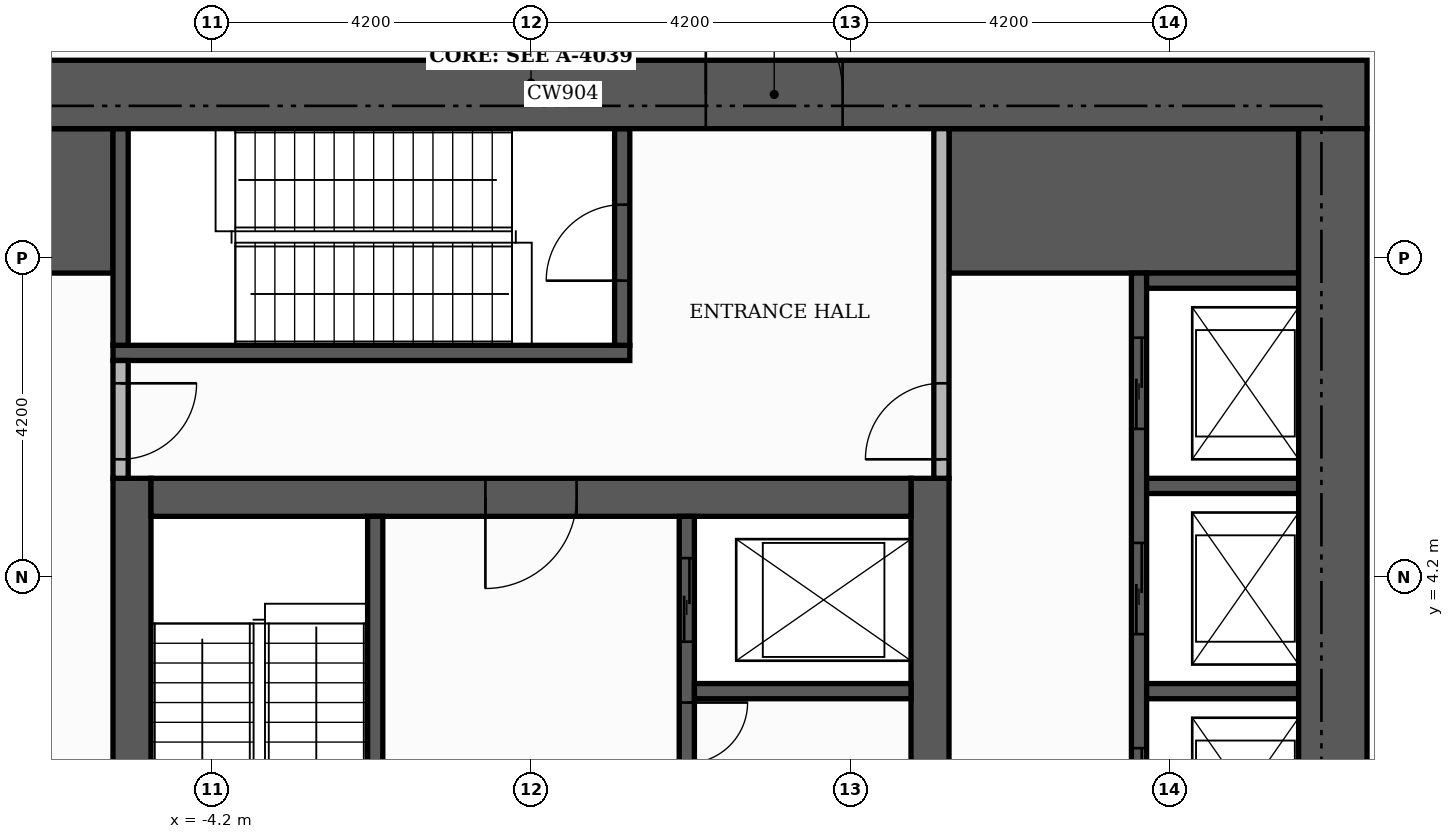
"""IFC4 building model, lengths in metres.
Left out: names, types, materials, properties, quantities, classifications, styles, units other than length and angle.
Written with IfcOpenShell. Run it as: python <this file> out.ifc"""

import sys

from ifc_helpers import new_model, si_unit, direction, frame, frame_2d, origin, place, context, subcontext, project, spatial, rectangle, extrude, element, fill, save


model = new_model("IFC4")
c1 = context("Model", 3, precision=1e-05, world=origin(), true_north=direction((0.0, 1.0)))
c2 = subcontext(c1, "Body", "Model", "MODEL_VIEW")
j1 = project(units=[si_unit("LENGTHUNIT", "METRE"), si_unit("PLANEANGLEUNIT", "RADIAN")], contexts=[c1])
p1 = place(None, origin())
s1 = spatial("IfcSite", under=j1, at=p1, CompositionType="ELEMENT")
p2 = place(p1, origin())
s2 = spatial("IfcBuilding", under=s1, at=p2, CompositionType="ELEMENT")
p3 = place(p2, frame((0.0, 0.0, 235.2)))
s3 = spatial("IfcBuildingStorey", under=s2, at=p3, CompositionType="ELEMENT", Elevation=235.2)
for number, where, z_axis, x_axis in (
    (1, (-5.25, -5.0, 0.0), (0.0, 0.0, 1.0), (0.0, 1.0, 0.0)),
    (2, (5.25, -5.0, 0.0), (0.0, 0.0, 1.0), (0.0, 1.0, 0.0)),
):
    element("IfcWall", number, at=place(p3, frame(where, z_axis=z_axis, x_axis=x_axis)), inside=s3, PredefinedType="SHEAR", context=c2, shape_type="SweptSolid", body=[
        extrude(rectangle(XDim=10.5, YDim=0.5, at=frame_2d((5.25, 0.0))), origin(), (0.0, 0.0, 1.0), 4.98),
    ])
p4 = place(p3, frame((-5.0, 5.25, 0.0), z_axis=(0.0, 0.0, 1.0), x_axis=(1.0, 0.0, 0.0)))
e3 = element("IfcWall", 3, at=p4, inside=s3, PredefinedType="SHEAR", context=c2, shape_type="SweptSolid", body=[
    extrude(rectangle(XDim=10.0, YDim=0.5, at=frame_2d((5.0, 0.0))), origin(), (0.0, 0.0, 1.0), 4.98),
])
p5 = place(p4, frame((4.4, 0.0, 0.0)))
e4 = element("IfcOpeningElement", 4, at=p5, cuts=e3, PredefinedType="OPENING", context=c2, shape_type="SweptSolid", body=[
    extrude(rectangle(XDim=1.2, YDim=2.1, at=frame_2d((0.6, 1.05))), frame((0.0, 0.26, 0.0), z_axis=(0.0, -1.0, 0.0), x_axis=(1.0, 0.0, 0.0)), (0.0, 0.0, 1.0), 0.52),
])
for number, where, z_axis, x_axis in (
    (5, (-10.1, 9.15, 0.0), (0.0, 0.0, 1.0), (1.0, 0.0, 0.0)),
    (6, (5.5, 9.15, 0.0), (0.0, 0.0, 1.0), (1.0, 0.0, 0.0)),
):
    element("IfcWall", number, at=place(p3, frame(where, z_axis=z_axis, x_axis=x_axis)), inside=s3, PredefinedType="SHEAR", context=c2, shape_type="SweptSolid", body=[
        extrude(rectangle(XDim=4.6, YDim=1.9, at=frame_2d((2.3, 0.0))), origin(), (0.0, 0.0, 1.0), 4.98),
    ])
p6 = place(p3, frame((-2.05, -1.4, 0.0), z_axis=(0.0, 0.0, 1.0), x_axis=(0.0, 1.0, 0.0)))
e7 = element("IfcWall", 7, at=p6, inside=s3, PredefinedType="SHEAR", context=c2, shape_type="SweptSolid", body=[
    extrude(rectangle(XDim=6.4, YDim=0.2, at=frame_2d((3.2, 0.0))), origin(), (0.0, 0.0, 1.0), 4.98),
])
p7 = place(p6, frame((0.15, 0.0, 0.0)))
e8 = element("IfcOpeningElement", 8, at=p7, cuts=e7, PredefinedType="OPENING", context=c2, shape_type="SweptSolid", body=[
    extrude(rectangle(XDim=1.0, YDim=2.1, at=frame_2d((0.5, 1.05))), frame((0.0, 0.11, 0.0), z_axis=(0.0, -1.0, 0.0), x_axis=(1.0, 0.0, 0.0)), (0.0, 0.0, 1.0), 0.22),
])
p8 = place(p3, frame((-5.5, 7.15, 0.0), z_axis=(0.0, 0.0, 1.0), x_axis=(1.0, 0.0, 0.0)))
e9 = element("IfcWall", 9, at=p8, inside=s3, PredefinedType="SHEAR", context=c2, shape_type="SweptSolid", body=[
    extrude(rectangle(XDim=6.8, YDim=0.2, at=frame_2d((3.4, 0.0))), origin(), (0.0, 0.0, 1.0), 4.98),
])
p9 = place(p3, frame((-5.4, 7.25, 0.0), z_axis=(0.0, 0.0, 1.0), x_axis=(0.0, 1.0, 0.0)))
e10 = element("IfcWall", 10, at=p9, inside=s3, PredefinedType="SHEAR", context=c2, shape_type="SweptSolid", body=[
    extrude(rectangle(XDim=2.85, YDim=0.2, at=frame_2d((1.425, 0.0))), origin(), (0.0, 0.0, 1.0), 4.98),
])
p10 = place(p3, frame((1.2, 7.25, 0.0), z_axis=(0.0, 0.0, 1.0), x_axis=(0.0, 1.0, 0.0)))
e11 = element("IfcWall", 11, at=p10, inside=s3, PredefinedType="SHEAR", context=c2, shape_type="SweptSolid", body=[
    extrude(rectangle(XDim=2.85, YDim=0.2, at=frame_2d((1.425, 0.0))), origin(), (0.0, 0.0, 1.0), 4.98),
])
p11 = place(p10, frame((0.85, 0.0, 0.0)))
e12 = element("IfcOpeningElement", 12, at=p11, cuts=e11, PredefinedType="OPENING", context=c2, shape_type="SweptSolid", body=[
    extrude(rectangle(XDim=1.0, YDim=2.1, at=frame_2d((0.5, 1.05))), frame((0.0, 0.11, 0.0), z_axis=(0.0, -1.0, 0.0), x_axis=(1.0, 0.0, 0.0)), (0.0, 0.0, 1.0), 0.22),
])
p12 = place(p3, frame((8.0, -8.2, 0.0), z_axis=(0.0, 0.0, 1.0), x_axis=(0.0, 1.0, 0.0)))
e13 = element("IfcWall", 13, at=p12, inside=s3, PredefinedType="SHEAR", context=c2, shape_type="SweptSolid", body=[
    extrude(rectangle(XDim=16.4, YDim=0.2, at=frame_2d((8.2, 0.0))), origin(), (0.0, 0.0, 1.0), 4.98),
])
p13 = place(p12, frame((0.85, 0.0, 0.0)))
e14 = element("IfcOpeningElement", 14, at=p13, cuts=e13, PredefinedType="OPENING", context=c2, shape_type="SweptSolid", body=[
    extrude(rectangle(XDim=1.2, YDim=2.1, at=frame_2d((0.6, 1.05))), frame((0.0, 0.11, 0.0), z_axis=(0.0, -1.0, 0.0), x_axis=(1.0, 0.0, 0.0)), (0.0, 0.0, 1.0), 0.22),
])
p14 = place(p12, frame((3.55, 0.0, 0.0)))
e15 = element("IfcOpeningElement", 15, at=p14, cuts=e13, PredefinedType="OPENING", context=c2, shape_type="SweptSolid", body=[
    extrude(rectangle(XDim=1.2, YDim=2.1, at=frame_2d((0.6, 1.05))), frame((0.0, 0.11, 0.0), z_axis=(0.0, -1.0, 0.0), x_axis=(1.0, 0.0, 0.0)), (0.0, 0.0, 1.0), 0.22),
])
p15 = place(p12, frame((6.25, 0.0, 0.0)))
e16 = element("IfcOpeningElement", 16, at=p15, cuts=e13, PredefinedType="OPENING", context=c2, shape_type="SweptSolid", body=[
    extrude(rectangle(XDim=1.2, YDim=2.1, at=frame_2d((0.6, 1.05))), frame((0.0, 0.11, 0.0), z_axis=(0.0, -1.0, 0.0), x_axis=(1.0, 0.0, 0.0)), (0.0, 0.0, 1.0), 0.22),
])
p16 = place(p12, frame((8.95, 0.0, 0.0)))
e17 = element("IfcOpeningElement", 17, at=p16, cuts=e13, PredefinedType="OPENING", context=c2, shape_type="SweptSolid", body=[
    extrude(rectangle(XDim=1.2, YDim=2.1, at=frame_2d((0.6, 1.05))), frame((0.0, 0.11, 0.0), z_axis=(0.0, -1.0, 0.0), x_axis=(1.0, 0.0, 0.0)), (0.0, 0.0, 1.0), 0.22),
])
p17 = place(p12, frame((11.65, 0.0, 0.0)))
e18 = element("IfcOpeningElement", 18, at=p17, cuts=e13, PredefinedType="OPENING", context=c2, shape_type="SweptSolid", body=[
    extrude(rectangle(XDim=1.2, YDim=2.1, at=frame_2d((0.6, 1.05))), frame((0.0, 0.11, 0.0), z_axis=(0.0, -1.0, 0.0), x_axis=(1.0, 0.0, 0.0)), (0.0, 0.0, 1.0), 0.22),
])
p18 = place(p12, frame((14.35, 0.0, 0.0)))
e19 = element("IfcOpeningElement", 19, at=p18, cuts=e13, PredefinedType="OPENING", context=c2, shape_type="SweptSolid", body=[
    extrude(rectangle(XDim=1.2, YDim=2.1, at=frame_2d((0.6, 1.05))), frame((0.0, 0.11, 0.0), z_axis=(0.0, -1.0, 0.0), x_axis=(1.0, 0.0, 0.0)), (0.0, 0.0, 1.0), 0.22),
])
p19 = place(p3, frame((2.05, 1.6, 0.0), z_axis=(0.0, 0.0, 1.0), x_axis=(0.0, 1.0, 0.0)))
e20 = element("IfcWall", 20, at=p19, inside=s3, PredefinedType="SHEAR", context=c2, shape_type="SweptSolid", body=[
    extrude(rectangle(XDim=3.4, YDim=0.2, at=frame_2d((1.7, 0.0))), origin(), (0.0, 0.0, 1.0), 4.98),
])
p20 = place(p19, frame((1.75, 0.0, 0.0)))
e21 = element("IfcOpeningElement", 21, at=p20, cuts=e20, PredefinedType="OPENING", context=c2, shape_type="SweptSolid", body=[
    extrude(rectangle(XDim=1.1, YDim=2.1, at=frame_2d((0.55, 1.05))), frame((0.0, 0.11, 0.0), z_axis=(0.0, -1.0, 0.0), x_axis=(1.0, 0.0, 0.0)), (0.0, 0.0, 1.0), 0.22),
])
p21 = place(p19, frame((0.15, 0.0, 0.0)))
e22 = element("IfcOpeningElement", 22, at=p21, cuts=e20, PredefinedType="OPENING", context=c2, shape_type="SweptSolid", body=[
    extrude(rectangle(XDim=0.8, YDim=2.1, at=frame_2d((0.4, 1.05))), frame((0.0, 0.11, 0.0), z_axis=(0.0, -1.0, 0.0), x_axis=(1.0, 0.0, 0.0)), (0.0, 0.0, 1.0), 0.22),
])
p22 = place(p3, frame((2.15, 2.7, 0.0), z_axis=(0.0, 0.0, 1.0), x_axis=(1.0, 0.0, 0.0)))
e23 = element("IfcWall", 23, at=p22, inside=s3, PredefinedType="SHEAR", context=c2, shape_type="SweptSolid", body=[
    extrude(rectangle(XDim=2.85, YDim=0.2, at=frame_2d((1.425, 0.0))), origin(), (0.0, 0.0, 1.0), 4.98),
])
for number, where, z_axis, x_axis in (
    (24, (8.1, 2.7, 0.0), (0.0, 0.0, 1.0), (1.0, 0.0, 0.0)),
    (25, (8.1, 5.4, 0.0), (0.0, 0.0, 1.0), (1.0, 0.0, 0.0)),
    (26, (8.1, 8.1, 0.0), (0.0, 0.0, 1.0), (1.0, 0.0, 0.0)),
):
    element("IfcWall", number, at=place(p3, frame(where, z_axis=z_axis, x_axis=x_axis)), inside=s3, PredefinedType="SHEAR", context=c2, shape_type="SweptSolid", body=[
        extrude(rectangle(XDim=2.0, YDim=0.2, at=frame_2d((1.0, 0.0))), origin(), (0.0, 0.0, 1.0), 4.98),
    ])
p23 = place(p3, frame((-11.0, 10.55, 0.0), z_axis=(0.0, 0.0, 1.0), x_axis=(1.0, 0.0, 0.0)))
e27 = element("IfcWall", 27, at=p23, inside=s3, PredefinedType="SHEAR", context=c2, shape_type="SweptSolid", body=[
    extrude(rectangle(XDim=22.0, YDim=0.9, at=frame_2d((11.0, 0.0))), origin(), (0.0, 0.0, 1.0), 4.98),
])
p24 = place(p23, frame((13.3, 0.0, 0.0)))
e28 = element("IfcOpeningElement", 28, at=p24, cuts=e27, PredefinedType="OPENING", context=c2, shape_type="SweptSolid", body=[
    extrude(rectangle(XDim=1.8, YDim=2.2, at=frame_2d((0.9, 1.1))), frame((0.0, 0.46, 0.0), z_axis=(0.0, -1.0, 0.0), x_axis=(1.0, 0.0, 0.0)), (0.0, 0.0, 1.0), 0.92),
])
p25 = place(p3, frame((10.55, -10.1, 0.0), z_axis=(0.0, 0.0, 1.0), x_axis=(0.0, 1.0, 0.0)))
e29 = element("IfcWall", 29, at=p25, inside=s3, PredefinedType="SHEAR", context=c2, shape_type="SweptSolid", body=[
    extrude(rectangle(XDim=20.2, YDim=0.9, at=frame_2d((10.1, 0.0))), origin(), (0.0, 0.0, 1.0), 4.98),
])
p26 = place(p3, frame((-5.4, 5.5, 0.0), z_axis=(0.0, 0.0, 1.0), x_axis=(0.0, 1.0, 0.0)))
e30 = element("IfcWall", 30, at=p26, inside=s3, PredefinedType="PARTITIONING", context=c2, shape_type="SweptSolid", body=[
    extrude(rectangle(XDim=1.55, YDim=0.2, at=frame_2d((0.775, 0.0))), origin(), (0.0, 0.0, 1.0), 4.98),
])
p27 = place(p26, frame((0.25, 0.0, 0.0)))
e31 = element("IfcOpeningElement", 31, at=p27, cuts=e30, PredefinedType="OPENING", context=c2, shape_type="SweptSolid", body=[
    extrude(rectangle(XDim=1.0, YDim=2.1, at=frame_2d((0.5, 1.05))), frame((0.0, 0.11, 0.0), z_axis=(0.0, -1.0, 0.0), x_axis=(1.0, 0.0, 0.0)), (0.0, 0.0, 1.0), 0.22),
])
p28 = place(p3, frame((5.4, 5.5, 0.0), z_axis=(0.0, 0.0, 1.0), x_axis=(0.0, 1.0, 0.0)))
e32 = element("IfcWall", 32, at=p28, inside=s3, PredefinedType="PARTITIONING", context=c2, shape_type="SweptSolid", body=[
    extrude(rectangle(XDim=4.6, YDim=0.2, at=frame_2d((2.3, 0.0))), origin(), (0.0, 0.0, 1.0), 4.98),
])
p29 = place(p28, frame((0.25, 0.0, 0.0)))
e33 = element("IfcOpeningElement", 33, at=p29, cuts=e32, PredefinedType="OPENING", context=c2, shape_type="SweptSolid", body=[
    extrude(rectangle(XDim=1.0, YDim=2.1, at=frame_2d((0.5, 1.05))), frame((0.0, 0.11, 0.0), z_axis=(0.0, -1.0, 0.0), x_axis=(1.0, 0.0, 0.0)), (0.0, 0.0, 1.0), 0.22),
])
p30 = place(p16, origin())
e34 = element("IfcDoor", 34, at=p30, inside=s3, OperationType="SLIDING_TO_LEFT", PredefinedType="DOOR", context=c2, shape_type="SweptSolid", body=[
    extrude(rectangle(XDim=1.2, YDim=2.1, at=frame_2d((0.6, 1.05))), frame((0.0, 0.025, 0.0), z_axis=(0.0, -1.0, 0.0), x_axis=(1.0, 0.0, 0.0)), (0.0, 0.0, 1.0), 0.05),
])
fill(e17, e34)
p31 = place(p17, origin())
e35 = element("IfcDoor", 35, at=p31, inside=s3, OperationType="SLIDING_TO_LEFT", PredefinedType="DOOR", context=c2, shape_type="SweptSolid", body=[
    extrude(rectangle(XDim=1.2, YDim=2.1, at=frame_2d((0.6, 1.05))), frame((0.0, 0.025, 0.0), z_axis=(0.0, -1.0, 0.0), x_axis=(1.0, 0.0, 0.0)), (0.0, 0.0, 1.0), 0.05),
])
fill(e18, e35)
p32 = place(p18, origin())
e36 = element("IfcDoor", 36, at=p32, inside=s3, OperationType="SLIDING_TO_LEFT", PredefinedType="DOOR", context=c2, shape_type="SweptSolid", body=[
    extrude(rectangle(XDim=1.2, YDim=2.1, at=frame_2d((0.6, 1.05))), frame((0.0, 0.025, 0.0), z_axis=(0.0, -1.0, 0.0), x_axis=(1.0, 0.0, 0.0)), (0.0, 0.0, 1.0), 0.05),
])
fill(e19, e36)
p33 = place(p20, origin())
e37 = element("IfcDoor", 37, at=p33, inside=s3, OperationType="SLIDING_TO_LEFT", PredefinedType="DOOR", context=c2, shape_type="SweptSolid", body=[
    extrude(rectangle(XDim=1.1, YDim=2.1, at=frame_2d((0.55, 1.05))), frame((0.0, 0.025, 0.0), z_axis=(0.0, -1.0, 0.0), x_axis=(1.0, 0.0, 0.0)), (0.0, 0.0, 1.0), 0.05),
])
fill(e21, e37)
p34 = place(p21, frame((0.8, 0.0, 0.0), z_axis=(0.0, 0.0, 1.0), x_axis=(-1.0, 0.0, 0.0)))
e38 = element("IfcDoor", 38, at=p34, inside=s3, OperationType="SINGLE_SWING_RIGHT", PredefinedType="DOOR", context=c2, shape_type="SweptSolid", body=[
    extrude(rectangle(XDim=0.8, YDim=2.1, at=frame_2d((0.4, 1.05))), frame((0.0, 0.025, 0.0), z_axis=(0.0, -1.0, 0.0), x_axis=(1.0, 0.0, 0.0)), (0.0, 0.0, 1.0), 0.05),
])
fill(e22, e38)
p35 = place(p5, frame((1.2, 0.0, 0.0), z_axis=(0.0, 0.0, 1.0), x_axis=(-1.0, 0.0, 0.0)))
e39 = element("IfcDoor", 39, at=p35, inside=s3, OperationType="SINGLE_SWING_LEFT", PredefinedType="DOOR", context=c2, shape_type="SweptSolid", body=[
    extrude(rectangle(XDim=1.2, YDim=2.1, at=frame_2d((0.6, 1.05))), frame((0.0, 0.025, 0.0), z_axis=(0.0, -1.0, 0.0), x_axis=(1.0, 0.0, 0.0)), (0.0, 0.0, 1.0), 0.05),
])
fill(e4, e39)
p36 = place(p11, origin())
e40 = element("IfcDoor", 40, at=p36, inside=s3, OperationType="SINGLE_SWING_LEFT", PredefinedType="DOOR", context=c2, shape_type="SweptSolid", body=[
    extrude(rectangle(XDim=1.0, YDim=2.1, at=frame_2d((0.5, 1.05))), frame((0.0, 0.025, 0.0), z_axis=(0.0, -1.0, 0.0), x_axis=(1.0, 0.0, 0.0)), (0.0, 0.0, 1.0), 0.05),
])
fill(e12, e40)
p37 = place(p27, frame((1.0, 0.0, 0.0), z_axis=(0.0, 0.0, 1.0), x_axis=(-1.0, 0.0, 0.0)))
e41 = element("IfcDoor", 41, at=p37, inside=s3, OperationType="SINGLE_SWING_RIGHT", PredefinedType="DOOR", context=c2, shape_type="SweptSolid", body=[
    extrude(rectangle(XDim=1.0, YDim=2.1, at=frame_2d((0.5, 1.05))), frame((0.0, 0.025, 0.0), z_axis=(0.0, -1.0, 0.0), x_axis=(1.0, 0.0, 0.0)), (0.0, 0.0, 1.0), 0.05),
])
fill(e31, e41)
p38 = place(p29, origin())
e42 = element("IfcDoor", 42, at=p38, inside=s3, OperationType="SINGLE_SWING_LEFT", PredefinedType="DOOR", context=c2, shape_type="SweptSolid", body=[
    extrude(rectangle(XDim=1.0, YDim=2.1, at=frame_2d((0.5, 1.05))), frame((0.0, 0.025, 0.0), z_axis=(0.0, -1.0, 0.0), x_axis=(1.0, 0.0, 0.0)), (0.0, 0.0, 1.0), 0.05),
])
fill(e33, e42)
p39 = place(p24, origin())
e43 = element("IfcDoor", 43, at=p39, inside=s3, OperationType="DOUBLE_DOOR_SINGLE_SWING", PredefinedType="DOOR", context=c2, shape_type="SweptSolid", body=[
    extrude(rectangle(XDim=1.8, YDim=2.2, at=frame_2d((0.9, 1.1))), frame((0.0, 0.025, 0.0), z_axis=(0.0, -1.0, 0.0), x_axis=(1.0, 0.0, 0.0)), (0.0, 0.0, 1.0), 0.05),
])
fill(e28, e43)
save(model, sys.argv[1])
